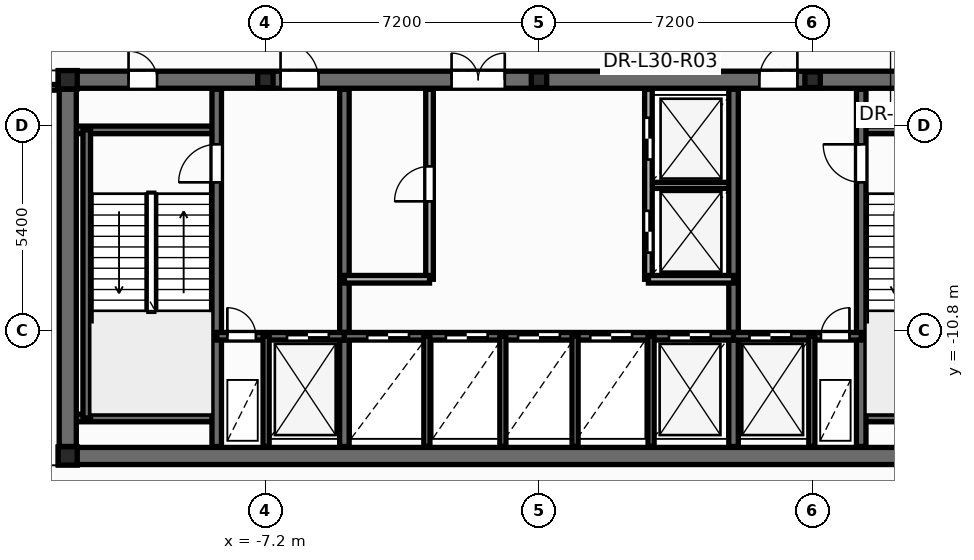
"""IFC4 building model, lengths in metres.
Left out: names, types, materials, properties, quantities, classifications, styles, units other than length and angle.
Written with IfcOpenShell. Run it as: python <this file> out.ifc"""

import sys

from ifc_helpers import new_model, si_unit, direction, frame, frame_2d, origin, origin_2d, place, context, subcontext, project, spatial, rectangle, i_section, extrude, element, fill, save


model = new_model("IFC4")
c1 = context("Model", 3, precision=1e-05, world=origin(), true_north=direction((0.0, 1.0)))
c2 = subcontext(c1, "Body", "Model", "MODEL_VIEW")
j1 = project(units=[si_unit("LENGTHUNIT", "METRE"), si_unit("PLANEANGLEUNIT", "RADIAN")], contexts=[c1])
p1 = place(None, origin())
s1 = spatial("IfcSite", under=j1, at=p1, CompositionType="ELEMENT")
p2 = place(p1, origin())
s2 = spatial("IfcBuilding", under=s1, at=p2, CompositionType="ELEMENT")
p3 = place(p2, frame((0.0, 0.0, 117.6)))
s3 = spatial("IfcBuildingStorey", under=s2, at=p3, CompositionType="ELEMENT", Elevation=117.6)
for number, where, z_axis, x_axis in (
    (1, (-12.4, -14.1, 0.0), (0.0, 0.0, 1.0), (1.0, 0.0, 0.0)),
    (2, (-12.4, -4.2, 0.0), (0.0, 0.0, 1.0), (1.0, 0.0, 0.0)),
):
    element("IfcColumn", number, at=place(p3, frame(where, z_axis=z_axis, x_axis=x_axis)), inside=s3, PredefinedType="COLUMN", context=c2, shape_type="SweptSolid", body=[
        extrude(i_section(OverallWidth=0.5, OverallDepth=0.482, WebThickness=0.04, FlangeThickness=0.045, at=origin_2d()), origin(), (0.0, 0.0, 1.0), 4.5),
    ])
for number, where, z_axis, x_axis in (
    (3, (-7.2, -4.2, 0.0), (0.0, 0.0, 1.0), (1.0, 0.0, 0.0)),
    (4, (0.0, -4.2, 0.0), (0.0, 0.0, 1.0), (1.0, 0.0, 0.0)),
    (5, (7.2, -4.2, 0.0), (0.0, 0.0, 1.0), (1.0, 0.0, 0.0)),
):
    element("IfcColumn", number, at=place(p3, frame(where, z_axis=z_axis, x_axis=x_axis)), inside=s3, PredefinedType="PILASTER", context=c2, shape_type="SweptSolid", body=[
        extrude(i_section(OverallWidth=0.405, OverallDepth=0.414, WebThickness=0.022, FlangeThickness=0.032, at=origin_2d()), origin(), (0.0, 0.0, 1.0), 4.5),
    ])
p4 = place(p3, frame((2.88, -6.98, 0.0), z_axis=(0.0, 0.0, 1.0), x_axis=(1.0, 0.0, 0.0)))
e6 = element("IfcWall", 6, at=p4, inside=s3, PredefinedType="PARTITIONING", context=c2, shape_type="SweptSolid", body=[
    extrude(rectangle(XDim=2.24, YDim=0.16, at=frame_2d((1.12, 0.0))), origin(), (0.0, 0.0, 1.0), 4.25),
])
p5 = place(p3, frame((-12.65, -14.1, 0.0), z_axis=(0.0, 0.0, 1.0), x_axis=(1.0, 0.0, 0.0)))
e7 = element("IfcWall", 7, at=p5, inside=s3, PredefinedType="SHEAR", context=c2, shape_type="SweptSolid", body=[
    extrude(rectangle(XDim=25.3, YDim=0.45, at=frame_2d((12.65, 0.0))), origin(), (0.0, 0.0, 1.0), 4.5),
])
p6 = place(p3, frame((-12.65, -4.2, 0.0), z_axis=(0.0, 0.0, 1.0), x_axis=(1.0, 0.0, 0.0)))
e8 = element("IfcWall", 8, at=p6, inside=s3, PredefinedType="SHEAR", context=c2, shape_type="SweptSolid", body=[
    extrude(rectangle(XDim=25.3, YDim=0.45, at=frame_2d((12.65, 0.0))), origin(), (0.0, 0.0, 1.0), 4.5),
])
p7 = place(p6, frame((1.85, 0.0, 0.0)))
e9 = element("IfcOpeningElement", 9, at=p7, cuts=e8, PredefinedType="OPENING", context=c2, shape_type="SweptSolid", body=[
    extrude(rectangle(XDim=0.756, YDim=2.054, at=frame_2d((0.375, 1.027))), frame((0.0, 0.235, 0.0), z_axis=(0.0, -1.0, 0.0), x_axis=(1.0, 0.0, 0.0)), (0.0, 0.0, 1.0), 0.47),
])
p8 = place(p6, frame((22.65, 0.0, 0.0)))
e10 = element("IfcOpeningElement", 10, at=p8, cuts=e8, PredefinedType="OPENING", context=c2, shape_type="SweptSolid", body=[
    extrude(rectangle(XDim=0.756, YDim=2.054, at=frame_2d((0.375, 1.027))), frame((0.0, 0.235, 0.0), z_axis=(0.0, -1.0, 0.0), x_axis=(1.0, 0.0, 0.0)), (0.0, 0.0, 1.0), 0.47),
])
p9 = place(p6, frame((5.85, 0.0, 0.0)))
e11 = element("IfcOpeningElement", 11, at=p9, cuts=e8, PredefinedType="OPENING", context=c2, shape_type="SweptSolid", body=[
    extrude(rectangle(XDim=1.006, YDim=2.104, at=frame_2d((0.5, 1.052))), frame((0.0, 0.235, 0.0), z_axis=(0.0, -1.0, 0.0), x_axis=(1.0, 0.0, 0.0)), (0.0, 0.0, 1.0), 0.47),
])
p10 = place(p6, frame((10.35, 0.0, 0.0)))
e12 = element("IfcOpeningElement", 12, at=p10, cuts=e8, PredefinedType="OPENING", context=c2, shape_type="SweptSolid", body=[
    extrude(rectangle(XDim=1.406, YDim=2.154, at=frame_2d((0.7, 1.077))), frame((0.0, 0.235, 0.0), z_axis=(0.0, -1.0, 0.0), x_axis=(1.0, 0.0, 0.0)), (0.0, 0.0, 1.0), 0.47),
])
p11 = place(p6, frame((18.45, 0.0, 0.0)))
e13 = element("IfcOpeningElement", 13, at=p11, cuts=e8, PredefinedType="OPENING", context=c2, shape_type="SweptSolid", body=[
    extrude(rectangle(XDim=1.006, YDim=2.104, at=frame_2d((0.5, 1.052))), frame((0.0, 0.235, 0.0), z_axis=(0.0, -1.0, 0.0), x_axis=(1.0, 0.0, 0.0)), (0.0, 0.0, 1.0), 0.47),
])
for number, where, z_axis, x_axis in (
    (14, (-12.35, -5.52, 0.0), (0.0, 0.0, 1.0), (1.0, 0.0, 0.0)),
    (15, (-12.35, -13.1, 0.0), (0.0, 0.0, 1.0), (1.0, 0.0, 0.0)),
):
    element("IfcWall", number, at=place(p3, frame(where, z_axis=z_axis, x_axis=x_axis)), inside=s3, PredefinedType="SOLIDWALL", context=c2, shape_type="SweptSolid", body=[
        extrude(rectangle(XDim=3.87, YDim=0.2, at=frame_2d((1.935, 0.0))), origin(), (0.0, 0.0, 1.0), 4.5),
    ])
p12 = place(p3, frame((-11.9, -13.1, 0.0), z_axis=(0.0, 0.0, 1.0), x_axis=(0.0, 1.0, 0.0)))
e16 = element("IfcWall", 16, at=p12, inside=s3, PredefinedType="SOLIDWALL", context=c2, shape_type="SweptSolid", body=[
    extrude(rectangle(XDim=7.58, YDim=0.2, at=frame_2d((3.79, 0.0))), origin(), (0.0, 0.0, 1.0), 4.5),
])
for number, where, z_axis, x_axis in (
    (17, (8.48, -5.52, 0.0), (0.0, 0.0, 1.0), (1.0, 0.0, 0.0)),
    (18, (8.48, -13.1, 0.0), (0.0, 0.0, 1.0), (1.0, 0.0, 0.0)),
):
    element("IfcWall", number, at=place(p3, frame(where, z_axis=z_axis, x_axis=x_axis)), inside=s3, PredefinedType="SOLIDWALL", context=c2, shape_type="SweptSolid", body=[
        extrude(rectangle(XDim=3.87, YDim=0.2, at=frame_2d((1.935, 0.0))), origin(), (0.0, 0.0, 1.0), 4.5),
    ])
p13 = place(p3, frame((-8.48, -13.85, 0.0), z_axis=(0.0, 0.0, 1.0), x_axis=(0.0, 1.0, 0.0)))
e19 = element("IfcWall", 19, at=p13, inside=s3, PredefinedType="SHEAR", context=c2, shape_type="SweptSolid", body=[
    extrude(rectangle(XDim=9.4, YDim=0.25, at=frame_2d((4.7, 0.0))), origin(), (0.0, 0.0, 1.0), 4.5),
])
p14 = place(p13, frame((6.95, 0.0, 0.0)))
e20 = element("IfcOpeningElement", 20, at=p14, cuts=e19, PredefinedType="OPENING", context=c2, shape_type="SweptSolid", body=[
    extrude(rectangle(XDim=1.006, YDim=2.104, at=frame_2d((0.5, 1.052))), frame((0.0, 0.135, 0.0), z_axis=(0.0, -1.0, 0.0), x_axis=(1.0, 0.0, 0.0)), (0.0, 0.0, 1.0), 0.27),
])
p15 = place(p3, frame((8.48, -13.85, 0.0), z_axis=(0.0, 0.0, 1.0), x_axis=(0.0, 1.0, 0.0)))
e21 = element("IfcWall", 21, at=p15, inside=s3, PredefinedType="SHEAR", context=c2, shape_type="SweptSolid", body=[
    extrude(rectangle(XDim=9.4, YDim=0.25, at=frame_2d((4.7, 0.0))), origin(), (0.0, 0.0, 1.0), 4.5),
])
p16 = place(p15, frame((6.95, 0.0, 0.0)))
e22 = element("IfcOpeningElement", 22, at=p16, cuts=e21, PredefinedType="OPENING", context=c2, shape_type="SweptSolid", body=[
    extrude(rectangle(XDim=1.006, YDim=2.104, at=frame_2d((0.5, 1.052))), frame((0.0, 0.135, 0.0), z_axis=(0.0, -1.0, 0.0), x_axis=(1.0, 0.0, 0.0)), (0.0, 0.0, 1.0), 0.27),
])
for number, where, z_axis, x_axis in (
    (23, (-5.12, -13.85, 0.0), (0.0, 0.0, 1.0), (0.0, 1.0, 0.0)),
    (24, (5.12, -13.85, 0.0), (0.0, 0.0, 1.0), (0.0, 1.0, 0.0)),
):
    element("IfcWall", number, at=place(p3, frame(where, z_axis=z_axis, x_axis=x_axis)), inside=s3, PredefinedType="SHEAR", context=c2, shape_type="SweptSolid", body=[
        extrude(rectangle(XDim=9.4, YDim=0.25, at=frame_2d((4.7, 0.0))), origin(), (0.0, 0.0, 1.0), 4.5),
    ])
p17 = place(p3, frame((-8.48, -10.95, 0.0), z_axis=(0.0, 0.0, 1.0), x_axis=(1.0, 0.0, 0.0)))
e25 = element("IfcWall", 25, at=p17, inside=s3, PredefinedType="SOLIDWALL", context=c2, shape_type="SweptSolid", body=[
    extrude(rectangle(XDim=3.36, YDim=0.2, at=frame_2d((1.68, 0.0))), origin(), (0.0, 0.0, 1.0), 4.5),
])
p18 = place(p17, frame((0.28, 0.0, 0.0)))
e26 = element("IfcOpeningElement", 26, at=p18, cuts=e25, PredefinedType="OPENING", context=c2, shape_type="SweptSolid", body=[
    extrude(rectangle(XDim=0.756, YDim=2.054, at=frame_2d((0.375, 1.027))), frame((0.0, 0.11, 0.0), z_axis=(0.0, -1.0, 0.0), x_axis=(1.0, 0.0, 0.0)), (0.0, 0.0, 1.0), 0.22),
])
p19 = place(p17, frame((1.85, 0.0, 0.0)))
e27 = element("IfcOpeningElement", 27, at=p19, cuts=e25, PredefinedType="OPENING", context=c2, shape_type="SweptSolid", body=[
    extrude(rectangle(XDim=1.106, YDim=2.104, at=frame_2d((0.55, 1.052))), frame((0.0, 0.11, 0.0), z_axis=(0.0, -1.0, 0.0), x_axis=(1.0, 0.0, 0.0)), (0.0, 0.0, 1.0), 0.22),
])
p20 = place(p3, frame((-5.12, -10.95, 0.0), z_axis=(0.0, 0.0, 1.0), x_axis=(1.0, 0.0, 0.0)))
e28 = element("IfcWall", 28, at=p20, inside=s3, PredefinedType="SOLIDWALL", context=c2, shape_type="SweptSolid", body=[
    extrude(rectangle(XDim=10.24, YDim=0.2, at=frame_2d((5.12, 0.0))), origin(), (0.0, 0.0, 1.0), 4.5),
])
p21 = place(p20, frame((0.6, 0.0, 0.0)))
e29 = element("IfcOpeningElement", 29, at=p21, cuts=e28, PredefinedType="OPENING", context=c2, shape_type="SweptSolid", body=[
    extrude(rectangle(XDim=1.106, YDim=2.104, at=frame_2d((0.55, 1.052))), frame((0.0, 0.11, 0.0), z_axis=(0.0, -1.0, 0.0), x_axis=(1.0, 0.0, 0.0)), (0.0, 0.0, 1.0), 0.22),
])
p22 = place(p20, frame((2.67, 0.0, 0.0)))
e30 = element("IfcOpeningElement", 30, at=p22, cuts=e28, PredefinedType="OPENING", context=c2, shape_type="SweptSolid", body=[
    extrude(rectangle(XDim=1.106, YDim=2.104, at=frame_2d((0.55, 1.052))), frame((0.0, 0.11, 0.0), z_axis=(0.0, -1.0, 0.0), x_axis=(1.0, 0.0, 0.0)), (0.0, 0.0, 1.0), 0.22),
])
p23 = place(p20, frame((4.57, 0.0, 0.0)))
e31 = element("IfcOpeningElement", 31, at=p23, cuts=e28, PredefinedType="OPENING", context=c2, shape_type="SweptSolid", body=[
    extrude(rectangle(XDim=1.106, YDim=2.104, at=frame_2d((0.55, 1.052))), frame((0.0, 0.11, 0.0), z_axis=(0.0, -1.0, 0.0), x_axis=(1.0, 0.0, 0.0)), (0.0, 0.0, 1.0), 0.22),
])
p24 = place(p20, frame((6.47, 0.0, 0.0)))
e32 = element("IfcOpeningElement", 32, at=p24, cuts=e28, PredefinedType="OPENING", context=c2, shape_type="SweptSolid", body=[
    extrude(rectangle(XDim=1.106, YDim=2.104, at=frame_2d((0.55, 1.052))), frame((0.0, 0.11, 0.0), z_axis=(0.0, -1.0, 0.0), x_axis=(1.0, 0.0, 0.0)), (0.0, 0.0, 1.0), 0.22),
])
p25 = place(p20, frame((8.54, 0.0, 0.0)))
e33 = element("IfcOpeningElement", 33, at=p25, cuts=e28, PredefinedType="OPENING", context=c2, shape_type="SweptSolid", body=[
    extrude(rectangle(XDim=1.106, YDim=2.104, at=frame_2d((0.55, 1.052))), frame((0.0, 0.11, 0.0), z_axis=(0.0, -1.0, 0.0), x_axis=(1.0, 0.0, 0.0)), (0.0, 0.0, 1.0), 0.22),
])
p26 = place(p3, frame((5.12, -10.95, 0.0), z_axis=(0.0, 0.0, 1.0), x_axis=(1.0, 0.0, 0.0)))
e34 = element("IfcWall", 34, at=p26, inside=s3, PredefinedType="SOLIDWALL", context=c2, shape_type="SweptSolid", body=[
    extrude(rectangle(XDim=3.36, YDim=0.2, at=frame_2d((1.68, 0.0))), origin(), (0.0, 0.0, 1.0), 4.5),
])
p27 = place(p26, frame((0.42, 0.0, 0.0)))
e35 = element("IfcOpeningElement", 35, at=p27, cuts=e34, PredefinedType="OPENING", context=c2, shape_type="SweptSolid", body=[
    extrude(rectangle(XDim=1.106, YDim=2.104, at=frame_2d((0.55, 1.052))), frame((0.0, 0.11, 0.0), z_axis=(0.0, -1.0, 0.0), x_axis=(1.0, 0.0, 0.0)), (0.0, 0.0, 1.0), 0.22),
])
p28 = place(p26, frame((2.3, 0.0, 0.0)))
e36 = element("IfcOpeningElement", 36, at=p28, cuts=e34, PredefinedType="OPENING", context=c2, shape_type="SweptSolid", body=[
    extrude(rectangle(XDim=0.756, YDim=2.054, at=frame_2d((0.375, 1.027))), frame((0.0, 0.11, 0.0), z_axis=(0.0, -1.0, 0.0), x_axis=(1.0, 0.0, 0.0)), (0.0, 0.0, 1.0), 0.22),
])
for number, where, z_axis, x_axis in (
    (37, (-7.18, -13.85, 0.0), (0.0, 0.0, 1.0), (0.0, 1.0, 0.0)),
    (38, (7.18, -13.85, 0.0), (0.0, 0.0, 1.0), (0.0, 1.0, 0.0)),
    (39, (-2.95, -13.85, 0.0), (0.0, 0.0, 1.0), (0.0, 1.0, 0.0)),
    (40, (2.95, -13.85, 0.0), (0.0, 0.0, 1.0), (0.0, 1.0, 0.0)),
):
    element("IfcWall", number, at=place(p3, frame(where, z_axis=z_axis, x_axis=x_axis)), inside=s3, PredefinedType="PARTITIONING", context=c2, shape_type="SweptSolid", body=[
        extrude(rectangle(XDim=2.9, YDim=0.16, at=frame_2d((1.45, 0.0))), origin(), (0.0, 0.0, 1.0), 3.275),
    ])
p29 = place(p3, frame((-12.4, -13.85, 0.0), z_axis=(0.0, 0.0, 1.0), x_axis=(0.0, 1.0, 0.0)))
e41 = element("IfcWall", 41, at=p29, inside=s3, PredefinedType="SHEAR", context=c2, shape_type="SweptSolid", body=[
    extrude(rectangle(XDim=9.4, YDim=0.45, at=frame_2d((4.7, 0.0))), origin(), (0.0, 0.0, 1.0), 4.5),
])
p30 = place(p3, frame((-2.88, -9.45, 0.0), z_axis=(0.0, 0.0, 1.0), x_axis=(0.0, 1.0, 0.0)))
e42 = element("IfcWall", 42, at=p30, inside=s3, PredefinedType="SOLIDWALL", context=c2, shape_type="SweptSolid", body=[
    extrude(rectangle(XDim=5.0, YDim=0.2, at=frame_2d((2.5, 0.0))), origin(), (0.0, 0.0, 1.0), 4.25),
])
p31 = place(p30, frame((2.05, 0.0, 0.0)))
e43 = element("IfcOpeningElement", 43, at=p31, cuts=e42, PredefinedType="OPENING", context=c2, shape_type="SweptSolid", body=[
    extrude(rectangle(XDim=0.926, YDim=2.104, at=frame_2d((0.46, 1.052))), frame((0.0, 0.11, 0.0), z_axis=(0.0, -1.0, 0.0), x_axis=(1.0, 0.0, 0.0)), (0.0, 0.0, 1.0), 0.22),
])
p32 = place(p3, frame((-5.12, -9.45, 0.0), z_axis=(0.0, 0.0, 1.0), x_axis=(1.0, 0.0, 0.0)))
e44 = element("IfcWall", 44, at=p32, inside=s3, PredefinedType="SOLIDWALL", context=c2, shape_type="SweptSolid", body=[
    extrude(rectangle(XDim=2.24, YDim=0.2, at=frame_2d((1.12, 0.0))), origin(), (0.0, 0.0, 1.0), 4.25),
])
p33 = place(p3, frame((2.88, -9.45, 0.0), z_axis=(0.0, 0.0, 1.0), x_axis=(0.0, 1.0, 0.0)))
e45 = element("IfcWall", 45, at=p33, inside=s3, PredefinedType="SOLIDWALL", context=c2, shape_type="SweptSolid", body=[
    extrude(rectangle(XDim=5.0, YDim=0.2, at=frame_2d((2.5, 0.0))), origin(), (0.0, 0.0, 1.0), 4.25),
])
p34 = place(p33, frame((0.7, 0.0, 0.0)))
e46 = element("IfcOpeningElement", 46, at=p34, cuts=e45, PredefinedType="OPENING", context=c2, shape_type="SweptSolid", body=[
    extrude(rectangle(XDim=1.106, YDim=2.104, at=frame_2d((0.55, 1.052))), frame((0.0, 0.11, 0.0), z_axis=(0.0, -1.0, 0.0), x_axis=(1.0, 0.0, 0.0)), (0.0, 0.0, 1.0), 0.22),
])
p35 = place(p33, frame((3.15, 0.0, 0.0)))
e47 = element("IfcOpeningElement", 47, at=p35, cuts=e45, PredefinedType="OPENING", context=c2, shape_type="SweptSolid", body=[
    extrude(rectangle(XDim=1.106, YDim=2.104, at=frame_2d((0.55, 1.052))), frame((0.0, 0.11, 0.0), z_axis=(0.0, -1.0, 0.0), x_axis=(1.0, 0.0, 0.0)), (0.0, 0.0, 1.0), 0.22),
])
p36 = place(p3, frame((2.88, -9.45, 0.0), z_axis=(0.0, 0.0, 1.0), x_axis=(1.0, 0.0, 0.0)))
e48 = element("IfcWall", 48, at=p36, inside=s3, PredefinedType="SOLIDWALL", context=c2, shape_type="SweptSolid", body=[
    extrude(rectangle(XDim=2.24, YDim=0.2, at=frame_2d((1.12, 0.0))), origin(), (0.0, 0.0, 1.0), 4.25),
])
for number, where, z_axis, x_axis in (
    (49, (-0.95, -13.85, 0.0), (0.0, 0.0, 1.0), (0.0, 1.0, 0.0)),
    (50, (0.95, -13.85, 0.0), (0.0, 0.0, 1.0), (0.0, 1.0, 0.0)),
):
    element("IfcWall", number, at=place(p3, frame(where, z_axis=z_axis, x_axis=x_axis)), inside=s3, PredefinedType="PARTITIONING", context=c2, shape_type="SweptSolid", body=[
        extrude(rectangle(XDim=2.9, YDim=0.16, at=frame_2d((1.45, 0.0))), origin(), (0.0, 0.0, 1.0), 3.275),
    ])
p37 = place(p3, frame((-15.2, -4.4, 0.0), z_axis=(0.0, 0.0, 1.0), x_axis=(1.0, 0.0, 0.0)))
e51 = element("IfcWall", 51, at=p37, inside=s3, PredefinedType="PARTITIONING", context=c2, shape_type="SweptSolid", body=[
    extrude(rectangle(XDim=2.548, YDim=0.15, at=frame_2d((1.274, 0.0))), origin(), (0.0, 0.0, 1.0), 3.225),
])
p38 = place(p37, frame((0.358, 0.0, 0.0)))
e52 = element("IfcOpeningElement", 52, at=p38, cuts=e51, PredefinedType="OPENING", context=c2, shape_type="SweptSolid", body=[
    extrude(rectangle(XDim=0.956, YDim=2.104, at=frame_2d((0.475, 1.052))), frame((0.0, 0.085, 0.0), z_axis=(0.0, -1.0, 0.0), x_axis=(1.0, 0.0, 0.0)), (0.0, 0.0, 1.0), 0.17),
])
p39 = place(p31, origin())
e53 = element("IfcDoor", 53, at=p39, inside=s3, OperationType="SINGLE_SWING_LEFT", PredefinedType="DOOR", context=c2, shape_type="SweptSolid", body=[
    extrude(rectangle(XDim=0.92, YDim=2.1, at=frame_2d((0.46, 1.05))), frame((0.0, 0.025, 0.0), z_axis=(0.0, -1.0, 0.0), x_axis=(1.0, 0.0, 0.0)), (0.0, 0.0, 1.0), 0.05),
])
fill(e43, e53)
p40 = place(p34, origin())
e54 = element("IfcDoor", 54, at=p40, inside=s3, OperationType="DOUBLE_DOOR_SLIDING", PredefinedType="DOOR", context=c2, shape_type="SweptSolid", body=[
    extrude(rectangle(XDim=1.1, YDim=2.1, at=frame_2d((0.55, 1.05))), frame((0.0, 0.025, 0.0), z_axis=(0.0, -1.0, 0.0), x_axis=(1.0, 0.0, 0.0)), (0.0, 0.0, 1.0), 0.05),
])
fill(e46, e54)
p41 = place(p35, origin())
e55 = element("IfcDoor", 55, at=p41, inside=s3, OperationType="DOUBLE_DOOR_SLIDING", PredefinedType="DOOR", context=c2, shape_type="SweptSolid", body=[
    extrude(rectangle(XDim=1.1, YDim=2.1, at=frame_2d((0.55, 1.05))), frame((0.0, 0.025, 0.0), z_axis=(0.0, -1.0, 0.0), x_axis=(1.0, 0.0, 0.0)), (0.0, 0.0, 1.0), 0.05),
])
fill(e47, e55)
p42 = place(p14, origin())
e56 = element("IfcDoor", 56, at=p42, inside=s3, OperationType="SINGLE_SWING_LEFT", PredefinedType="DOOR", context=c2, shape_type="SweptSolid", body=[
    extrude(rectangle(XDim=1.0, YDim=2.1, at=frame_2d((0.5, 1.05))), frame((0.0, 0.025, 0.0), z_axis=(0.0, -1.0, 0.0), x_axis=(1.0, 0.0, 0.0)), (0.0, 0.0, 1.0), 0.05),
])
fill(e20, e56)
p43 = place(p16, origin())
e57 = element("IfcDoor", 57, at=p43, inside=s3, OperationType="SINGLE_SWING_RIGHT", PredefinedType="DOOR", context=c2, shape_type="SweptSolid", body=[
    extrude(rectangle(XDim=1.0, YDim=2.1, at=frame_2d((0.5, 1.05))), frame((0.0, 0.025, 0.0), z_axis=(0.0, -1.0, 0.0), x_axis=(1.0, 0.0, 0.0)), (0.0, 0.0, 1.0), 0.05),
])
fill(e22, e57)
p44 = place(p18, origin())
e58 = element("IfcDoor", 58, at=p44, inside=s3, OperationType="SINGLE_SWING_LEFT", PredefinedType="DOOR", context=c2, shape_type="SweptSolid", body=[
    extrude(rectangle(XDim=0.75, YDim=2.05, at=frame_2d((0.375, 1.025))), frame((0.0, 0.025, 0.0), z_axis=(0.0, -1.0, 0.0), x_axis=(1.0, 0.0, 0.0)), (0.0, 0.0, 1.0), 0.05),
])
fill(e26, e58)
p45 = place(p19, origin())
e59 = element("IfcDoor", 59, at=p45, inside=s3, OperationType="DOUBLE_DOOR_SLIDING", PredefinedType="DOOR", context=c2, shape_type="SweptSolid", body=[
    extrude(rectangle(XDim=1.1, YDim=2.1, at=frame_2d((0.55, 1.05))), frame((0.0, 0.025, 0.0), z_axis=(0.0, -1.0, 0.0), x_axis=(1.0, 0.0, 0.0)), (0.0, 0.0, 1.0), 0.05),
])
fill(e27, e59)
p46 = place(p27, origin())
e60 = element("IfcDoor", 60, at=p46, inside=s3, OperationType="DOUBLE_DOOR_SLIDING", PredefinedType="DOOR", context=c2, shape_type="SweptSolid", body=[
    extrude(rectangle(XDim=1.1, YDim=2.1, at=frame_2d((0.55, 1.05))), frame((0.0, 0.025, 0.0), z_axis=(0.0, -1.0, 0.0), x_axis=(1.0, 0.0, 0.0)), (0.0, 0.0, 1.0), 0.05),
])
fill(e35, e60)
p47 = place(p28, origin())
e61 = element("IfcDoor", 61, at=p47, inside=s3, OperationType="SINGLE_SWING_RIGHT", PredefinedType="DOOR", context=c2, shape_type="SweptSolid", body=[
    extrude(rectangle(XDim=0.75, YDim=2.05, at=frame_2d((0.375, 1.025))), frame((0.0, 0.025, 0.0), z_axis=(0.0, -1.0, 0.0), x_axis=(1.0, 0.0, 0.0)), (0.0, 0.0, 1.0), 0.05),
])
fill(e36, e61)
p48 = place(p21, origin())
e62 = element("IfcDoor", 62, at=p48, inside=s3, OperationType="DOUBLE_DOOR_SLIDING", PredefinedType="DOOR", context=c2, shape_type="SweptSolid", body=[
    extrude(rectangle(XDim=1.1, YDim=2.1, at=frame_2d((0.55, 1.05))), frame((0.0, 0.025, 0.0), z_axis=(0.0, -1.0, 0.0), x_axis=(1.0, 0.0, 0.0)), (0.0, 0.0, 1.0), 0.05),
])
fill(e29, e62)
p49 = place(p22, origin())
e63 = element("IfcDoor", 63, at=p49, inside=s3, OperationType="DOUBLE_DOOR_SLIDING", PredefinedType="DOOR", context=c2, shape_type="SweptSolid", body=[
    extrude(rectangle(XDim=1.1, YDim=2.1, at=frame_2d((0.55, 1.05))), frame((0.0, 0.025, 0.0), z_axis=(0.0, -1.0, 0.0), x_axis=(1.0, 0.0, 0.0)), (0.0, 0.0, 1.0), 0.05),
])
fill(e30, e63)
p50 = place(p23, origin())
e64 = element("IfcDoor", 64, at=p50, inside=s3, OperationType="DOUBLE_DOOR_SLIDING", PredefinedType="DOOR", context=c2, shape_type="SweptSolid", body=[
    extrude(rectangle(XDim=1.1, YDim=2.1, at=frame_2d((0.55, 1.05))), frame((0.0, 0.025, 0.0), z_axis=(0.0, -1.0, 0.0), x_axis=(1.0, 0.0, 0.0)), (0.0, 0.0, 1.0), 0.05),
])
fill(e31, e64)
p51 = place(p24, origin())
e65 = element("IfcDoor", 65, at=p51, inside=s3, OperationType="DOUBLE_DOOR_SLIDING", PredefinedType="DOOR", context=c2, shape_type="SweptSolid", body=[
    extrude(rectangle(XDim=1.1, YDim=2.1, at=frame_2d((0.55, 1.05))), frame((0.0, 0.025, 0.0), z_axis=(0.0, -1.0, 0.0), x_axis=(1.0, 0.0, 0.0)), (0.0, 0.0, 1.0), 0.05),
])
fill(e32, e65)
p52 = place(p25, origin())
e66 = element("IfcDoor", 66, at=p52, inside=s3, OperationType="DOUBLE_DOOR_SLIDING", PredefinedType="DOOR", context=c2, shape_type="SweptSolid", body=[
    extrude(rectangle(XDim=1.1, YDim=2.1, at=frame_2d((0.55, 1.05))), frame((0.0, 0.025, 0.0), z_axis=(0.0, -1.0, 0.0), x_axis=(1.0, 0.0, 0.0)), (0.0, 0.0, 1.0), 0.05),
])
fill(e33, e66)
p53 = place(p7, origin())
e67 = element("IfcDoor", 67, at=p53, inside=s3, OperationType="SINGLE_SWING_LEFT", PredefinedType="DOOR", context=c2, shape_type="SweptSolid", body=[
    extrude(rectangle(XDim=0.75, YDim=2.05, at=frame_2d((0.375, 1.025))), frame((0.0, 0.025, 0.0), z_axis=(0.0, -1.0, 0.0), x_axis=(1.0, 0.0, 0.0)), (0.0, 0.0, 1.0), 0.05),
])
fill(e9, e67)
p54 = place(p9, origin())
e68 = element("IfcDoor", 68, at=p54, inside=s3, OperationType="SINGLE_SWING_LEFT", PredefinedType="DOOR", context=c2, shape_type="SweptSolid", body=[
    extrude(rectangle(XDim=1.0, YDim=2.1, at=frame_2d((0.5, 1.05))), frame((0.0, 0.025, 0.0), z_axis=(0.0, -1.0, 0.0), x_axis=(1.0, 0.0, 0.0)), (0.0, 0.0, 1.0), 0.05),
])
fill(e11, e68)
p55 = place(p10, origin())
e69 = element("IfcDoor", 69, at=p55, inside=s3, OperationType="DOUBLE_DOOR_SINGLE_SWING", PredefinedType="DOOR", context=c2, shape_type="SweptSolid", body=[
    extrude(rectangle(XDim=1.4, YDim=2.15, at=frame_2d((0.7, 1.075))), frame((0.0, 0.025, 0.0), z_axis=(0.0, -1.0, 0.0), x_axis=(1.0, 0.0, 0.0)), (0.0, 0.0, 1.0), 0.05),
])
fill(e12, e69)
p56 = place(p11, origin())
e70 = element("IfcDoor", 70, at=p56, inside=s3, OperationType="SINGLE_SWING_RIGHT", PredefinedType="DOOR", context=c2, shape_type="SweptSolid", body=[
    extrude(rectangle(XDim=1.0, YDim=2.1, at=frame_2d((0.5, 1.05))), frame((0.0, 0.025, 0.0), z_axis=(0.0, -1.0, 0.0), x_axis=(1.0, 0.0, 0.0)), (0.0, 0.0, 1.0), 0.05),
])
fill(e13, e70)
save(model, sys.argv[1])
